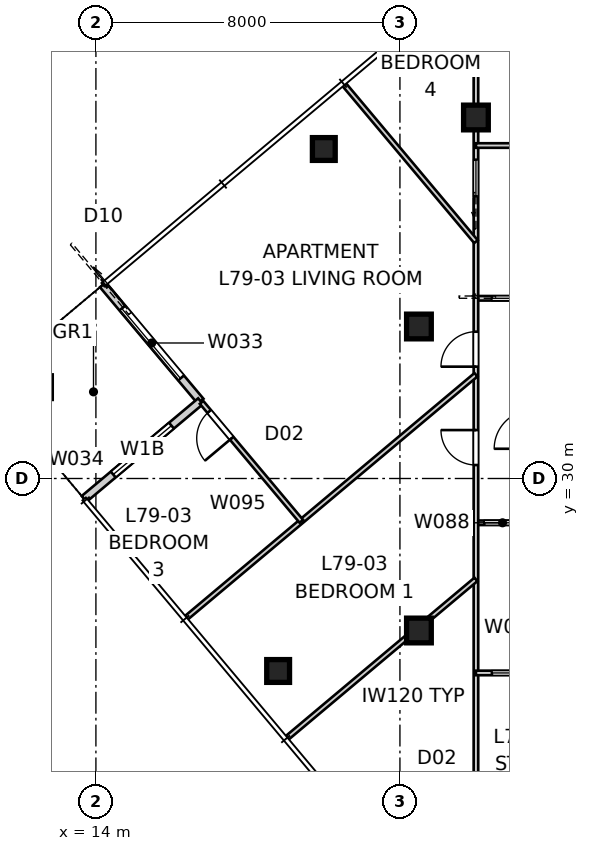
"""IFC4 building model, lengths in metres.
Left out: names, types, materials, properties, quantities, classifications, styles, units other than length and angle.
Written with IfcOpenShell. Run it as: python <this file> out.ifc"""

import sys

from ifc_helpers import new_model, si_unit, direction, frame, frame_2d, origin, origin_2d, place, context, subcontext, project, spatial, rectangle, extrude, element, fill, save


model = new_model("IFC4")
c1 = context("Model", 3, precision=1e-05, world=origin(), true_north=direction((0.0, 1.0)))
c2 = subcontext(c1, "Body", "Model", "MODEL_VIEW")
j1 = project(units=[si_unit("LENGTHUNIT", "METRE"), si_unit("PLANEANGLEUNIT", "RADIAN")], contexts=[c1])
p1 = place(None, origin())
s1 = spatial("IfcSite", under=j1, at=p1, CompositionType="ELEMENT")
p2 = place(p1, origin())
s2 = spatial("IfcBuilding", under=s1, at=p2, CompositionType="ELEMENT")
p3 = place(p2, frame((0.0, 0.0, 286.2)))
s3 = spatial("IfcBuildingStorey", under=s2, at=p3, CompositionType="ELEMENT", Elevation=286.2)
for number, where, z_axis, x_axis in (
    (1, (19.997, 38.671, 0.0), (0.0, 0.0, 1.0), (1.0, 0.0, 0.0)),
    (2, (18.795, 24.935, 0.0), (0.0, 0.0, 1.0), (1.0, 0.0, 0.0)),
):
    element("IfcColumn", number, at=place(p3, frame(where, z_axis=z_axis, x_axis=x_axis)), inside=s3, PredefinedType="COLUMN", context=c2, shape_type="SweptSolid", body=[
        extrude(rectangle(XDim=0.6, YDim=0.6, at=origin_2d()), origin(), (0.0, 0.0, 1.0), 3.4),
    ])
for number, where, z_axis, x_axis in (
    (3, (24.0, 39.5, 0.0), (0.0, 0.0, 1.0), (1.0, 0.0, 0.0)),
    (4, (22.5, 34.0, 0.0), (0.0, 0.0, 1.0), (1.0, 0.0, 0.0)),
    (5, (22.5, 26.0, 0.0), (0.0, 0.0, 1.0), (1.0, 0.0, 0.0)),
):
    element("IfcColumn", number, at=place(p3, frame(where, z_axis=z_axis, x_axis=x_axis)), inside=s3, PredefinedType="COLUMN", context=c2, shape_type="SweptSolid", body=[
        extrude(rectangle(XDim=0.65, YDim=0.65, at=origin_2d()), origin(), (0.0, 0.0, 1.0), 3.4),
    ])
p4 = place(p3, frame((14.183, 35.098, 0.0), z_axis=(0.0, 0.0, 1.0), x_axis=(0.642768287094, -0.766060656284, 0.0)))
e6 = element("IfcWall", 6, at=p4, inside=s3, PredefinedType="SOLIDWALL", context=c2, shape_type="SweptSolid", body=[
    extrude(rectangle(XDim=4.0, YDim=0.2, at=frame_2d((2.0, 0.0))), origin(), (0.0, 0.0, 1.0), 3.25),
])
p5 = place(p4, frame((0.8, 0.0, 0.0)))
e7 = element("IfcOpeningElement", 7, at=p5, cuts=e6, PredefinedType="OPENING", context=c2, shape_type="SweptSolid", body=[
    extrude(rectangle(XDim=2.4, YDim=2.4, at=frame_2d((1.2, 1.2))), frame((0.0, 0.11, 0.0), z_axis=(0.0, -1.0, 0.0), x_axis=(1.0, 0.0, 0.0)), (0.0, 0.0, 1.0), 0.22),
])
p6 = place(p3, frame((16.754, 32.034, 0.0), z_axis=(0.0, 0.0, 1.0), x_axis=(-0.766035437498, -0.642798342015, 0.0)))
e8 = element("IfcWall", 8, at=p6, inside=s3, PredefinedType="SOLIDWALL", context=c2, shape_type="SweptSolid", body=[
    extrude(rectangle(XDim=4.0, YDim=0.2, at=frame_2d((2.0, 0.0))), origin(), (0.0, 0.0, 1.0), 3.25),
])
p7 = place(p6, frame((1.0, 0.0, 0.45)))
e9 = element("IfcOpeningElement", 9, at=p7, cuts=e8, PredefinedType="OPENING", context=c2, shape_type="SweptSolid", body=[
    extrude(rectangle(XDim=2.0, YDim=1.8, at=frame_2d((1.0, 0.9))), frame((0.0, 0.11, 0.0), z_axis=(0.0, -1.0, 0.0), x_axis=(1.0, 0.0, 0.0)), (0.0, 0.0, 1.0), 0.22),
])
p8 = place(p3, frame((25.4, 28.834, 0.0), z_axis=(0.0, 0.0, 1.0), x_axis=(-1.0, 0.0, 0.0)))
e10 = element("IfcWall", 10, at=p8, inside=s3, PredefinedType="PARTITIONING", context=c2, shape_type="SweptSolid", body=[
    extrude(rectangle(XDim=1.4, YDim=0.12, at=frame_2d((0.7, 0.0))), origin(), (0.0, 0.0, 1.0), 3.25),
])
p9 = place(p8, frame((0.22, 0.0, 0.0)))
e11 = element("IfcOpeningElement", 11, at=p9, cuts=e10, PredefinedType="OPENING", context=c2, shape_type="SweptSolid", body=[
    extrude(rectangle(XDim=0.96, YDim=2.1, at=frame_2d((0.48, 1.05))), frame((0.0, 0.07, 0.0), z_axis=(0.0, -1.0, 0.0), x_axis=(1.0, 0.0, 0.0)), (0.0, 0.0, 1.0), 0.14),
])
p10 = place(p3, frame((24.0, 34.742, 0.0), z_axis=(0.0, 0.0, 1.0), x_axis=(1.0, 0.0, 0.0)))
e12 = element("IfcWall", 12, at=p10, inside=s3, PredefinedType="PARTITIONING", context=c2, shape_type="SweptSolid", body=[
    extrude(rectangle(XDim=3.9, YDim=0.12, at=frame_2d((1.95, 0.0))), origin(), (0.0, 0.0, 1.0), 3.25),
])
p11 = place(p10, frame((0.42, 0.0, 0.0)))
e13 = element("IfcOpeningElement", 13, at=p11, cuts=e12, PredefinedType="OPENING", context=c2, shape_type="SweptSolid", body=[
    extrude(rectangle(XDim=0.96, YDim=2.1, at=frame_2d((0.48, 1.05))), frame((0.0, 0.07, 0.0), z_axis=(0.0, -1.0, 0.0), x_axis=(1.0, 0.0, 0.0)), (0.0, 0.0, 1.0), 0.14),
])
p12 = place(p3, frame((24.0, 17.238, 0.0), z_axis=(0.0, 0.0, 1.0), x_axis=(0.0, 1.0, 0.0)))
e14 = element("IfcWall", 14, at=p12, inside=s3, PredefinedType="PARTITIONING", context=c2, shape_type="SweptSolid", body=[
    extrude(rectangle(XDim=26.045, YDim=0.12, at=frame_2d((13.022, 0.0))), origin(), (0.0, 0.0, 1.0), 2.55),
])
p13 = place(p12, frame((13.116, 0.0, 0.0)))
e15 = element("IfcOpeningElement", 15, at=p13, cuts=e14, PredefinedType="OPENING", context=c2, shape_type="SweptSolid", body=[
    extrude(rectangle(XDim=0.92, YDim=2.34, at=frame_2d((0.46, 1.17))), frame((0.0, 0.07, 0.0), z_axis=(0.0, -1.0, 0.0), x_axis=(1.0, 0.0, 0.0)), (0.0, 0.0, 1.0), 0.14),
])
p14 = place(p12, frame((15.705, 0.0, 0.0)))
e16 = element("IfcOpeningElement", 16, at=p14, cuts=e14, PredefinedType="OPENING", context=c2, shape_type="SweptSolid", body=[
    extrude(rectangle(XDim=0.92, YDim=2.34, at=frame_2d((0.46, 1.17))), frame((0.0, 0.07, 0.0), z_axis=(0.0, -1.0, 0.0), x_axis=(1.0, 0.0, 0.0)), (0.0, 0.0, 1.0), 0.14),
])
p15 = place(p12, frame((20.191, 0.0, 0.0)))
e17 = element("IfcOpeningElement", 17, at=p15, cuts=e14, PredefinedType="OPENING", context=c2, shape_type="SweptSolid", body=[
    extrude(rectangle(XDim=0.96, YDim=2.1, at=frame_2d((0.48, 1.05))), frame((0.0, 0.07, 0.0), z_axis=(0.0, -1.0, 0.0), x_axis=(1.0, 0.0, 0.0)), (0.0, 0.0, 1.0), 0.14),
])
p16 = place(p12, frame((3.631, 0.0, 0.0)))
e18 = element("IfcOpeningElement", 18, at=p16, cuts=e14, PredefinedType="OPENING", context=c2, shape_type="SweptSolid", body=[
    extrude(rectangle(XDim=0.92, YDim=2.34, at=frame_2d((0.46, 1.17))), frame((0.0, 0.07, 0.0), z_axis=(0.0, -1.0, 0.0), x_axis=(1.0, 0.0, 0.0)), (0.0, 0.0, 1.0), 0.14),
])
p17 = place(p3, frame((27.9, 24.883, 0.0), z_axis=(0.0, 0.0, 1.0), x_axis=(-1.0, 0.0, 0.0)))
e19 = element("IfcWall", 19, at=p17, inside=s3, PredefinedType="PARTITIONING", context=c2, shape_type="SweptSolid", body=[
    extrude(rectangle(XDim=3.9, YDim=0.12, at=frame_2d((1.95, 0.0))), origin(), (0.0, 0.0, 1.0), 3.25),
])
p18 = place(p17, frame((2.52, 0.0, 0.0)))
e20 = element("IfcOpeningElement", 20, at=p18, cuts=e19, PredefinedType="OPENING", context=c2, shape_type="SweptSolid", body=[
    extrude(rectangle(XDim=0.96, YDim=2.1, at=frame_2d((0.48, 1.05))), frame((0.0, 0.07, 0.0), z_axis=(0.0, -1.0, 0.0), x_axis=(1.0, 0.0, 0.0)), (0.0, 0.0, 1.0), 0.14),
])
p19 = place(p3, frame((27.9, 39.913, 0.0), z_axis=(0.0, 0.0, 1.0), x_axis=(-0.64279031777, 0.766042170759, 0.0)))
e21 = element("IfcWall", 21, at=p19, inside=s3, PredefinedType="PARTITIONING", context=c2, shape_type="SweptSolid", body=[
    extrude(rectangle(XDim=5.089, YDim=0.12, at=frame_2d((2.544, 0.0))), origin(), (0.0, 0.0, 1.0), 3.25),
])
p20 = place(p19, frame((2.084, 0.0, 0.0)))
e22 = element("IfcOpeningElement", 22, at=p20, cuts=e21, PredefinedType="OPENING", context=c2, shape_type="SweptSolid", body=[
    extrude(rectangle(XDim=0.96, YDim=2.1, at=frame_2d((0.48, 1.05))), frame((0.0, 0.07, 0.0), z_axis=(0.0, -1.0, 0.0), x_axis=(1.0, 0.0, 0.0)), (0.0, 0.0, 1.0), 0.14),
])
p21 = place(p3, frame((27.9, 38.762, 0.0), z_axis=(0.0, 0.0, 1.0), x_axis=(-1.0, 0.0, 0.0)))
e23 = element("IfcWall", 23, at=p21, inside=s3, PredefinedType="PARTITIONING", context=c2, shape_type="SweptSolid", body=[
    extrude(rectangle(XDim=3.9, YDim=0.12, at=frame_2d((1.95, 0.0))), origin(), (0.0, 0.0, 1.0), 2.796),
])
p22 = place(p21, frame((1.47, 0.0, 0.0)))
e24 = element("IfcOpeningElement", 24, at=p22, cuts=e23, PredefinedType="OPENING", context=c2, shape_type="SweptSolid", body=[
    extrude(rectangle(XDim=0.96, YDim=2.1, at=frame_2d((0.48, 1.05))), frame((0.0, 0.07, 0.0), z_axis=(0.0, -1.0, 0.0), x_axis=(1.0, 0.0, 0.0)), (0.0, 0.0, 1.0), 0.14),
])
p23 = place(p3, frame((24.0, 32.729, 0.0), z_axis=(0.0, 0.0, 1.0), x_axis=(-0.766044319693, -0.64278775678, 0.0)))
e25 = element("IfcWall", 25, at=p23, inside=s3, PredefinedType="PARTITIONING", context=c2, shape_type="SweptSolid", body=[
    extrude(rectangle(XDim=9.957, YDim=0.12, at=frame_2d((4.979, 0.0))), origin(), (0.0, 0.0, 1.0), 3.25),
])
p24 = place(p3, frame((19.406, 28.874, 0.0), z_axis=(0.0, 0.0, 1.0), x_axis=(-0.642767300664, 0.766061483953, 0.0)))
e26 = element("IfcWall", 26, at=p24, inside=s3, PredefinedType="PARTITIONING", context=c2, shape_type="SweptSolid", body=[
    extrude(rectangle(XDim=4.085, YDim=0.12, at=frame_2d((2.042, 0.0))), origin(), (0.0, 0.0, 1.0), 3.25),
])
p25 = place(p24, frame((2.853, 0.0, 0.0)))
e27 = element("IfcOpeningElement", 27, at=p25, cuts=e26, PredefinedType="OPENING", context=c2, shape_type="SweptSolid", body=[
    extrude(rectangle(XDim=0.92, YDim=2.34, at=frame_2d((0.46, 1.17))), frame((0.0, 0.07, 0.0), z_axis=(0.0, -1.0, 0.0), x_axis=(1.0, 0.0, 0.0)), (0.0, 0.0, 1.0), 0.14),
])
p26 = place(p3, frame((20.529, 40.37, 0.0), z_axis=(0.0, 0.0, 1.0), x_axis=(0.642799726543, -0.766034275706, 0.0)))
e28 = element("IfcWall", 28, at=p26, inside=s3, PredefinedType="PARTITIONING", context=c2, shape_type="SweptSolid", body=[
    extrude(rectangle(XDim=5.4, YDim=0.12, at=frame_2d((2.7, 0.0))), origin(), (0.0, 0.0, 1.0), 3.25),
])
p27 = place(p3, frame((24.0, 27.344, 0.0), z_axis=(0.0, 0.0, 1.0), x_axis=(-0.766051249233, -0.642779498388, 0.0)))
e29 = element("IfcWall", 29, at=p27, inside=s3, PredefinedType="PARTITIONING", context=c2, shape_type="SweptSolid", body=[
    extrude(rectangle(XDim=6.496, YDim=0.12, at=frame_2d((3.248, 0.0))), origin(), (0.0, 0.0, 1.0), 3.25),
])
p28 = place(p5, origin())
e30 = element("IfcDoor", 30, at=p28, inside=s3, OperationType="SLIDING_TO_LEFT", PredefinedType="DOOR", context=c2, shape_type="SweptSolid", body=[
    extrude(rectangle(XDim=2.4, YDim=2.4, at=frame_2d((1.2, 1.2))), frame((0.0, 0.025, 0.0), z_axis=(0.0, -1.0, 0.0), x_axis=(1.0, 0.0, 0.0)), (0.0, 0.0, 1.0), 0.05),
])
fill(e7, e30)
p29 = place(p7, origin())
e31 = element("IfcWindow", 31, at=p29, inside=s3, PartitioningType="SINGLE_PANEL", PredefinedType="WINDOW", context=c2, shape_type="SweptSolid", body=[
    extrude(rectangle(XDim=2.0, YDim=1.8, at=frame_2d((1.0, 0.9))), frame((0.0, 0.03, 0.0), z_axis=(0.0, -1.0, 0.0), x_axis=(1.0, 0.0, 0.0)), (0.0, 0.0, 1.0), 0.06),
])
fill(e9, e31)
p30 = place(p13, origin())
e32 = element("IfcDoor", 32, at=p30, inside=s3, OperationType="SINGLE_SWING_RIGHT", PredefinedType="DOOR", context=c2, shape_type="SweptSolid", body=[
    extrude(rectangle(XDim=0.92, YDim=2.34, at=frame_2d((0.46, 1.17))), frame((0.0, 0.025, 0.0), z_axis=(0.0, -1.0, 0.0), x_axis=(1.0, 0.0, 0.0)), (0.0, 0.0, 1.0), 0.05),
])
fill(e15, e32)
p31 = place(p11, origin())
e33 = element("IfcDoor", 33, at=p31, inside=s3, OperationType="SLIDING_TO_LEFT", PredefinedType="DOOR", context=c2, shape_type="SweptSolid", body=[
    extrude(rectangle(XDim=0.96, YDim=2.1, at=frame_2d((0.48, 1.05))), frame((0.0, 0.025, 0.0), z_axis=(0.0, -1.0, 0.0), x_axis=(1.0, 0.0, 0.0)), (0.0, 0.0, 1.0), 0.05),
])
fill(e13, e33)
p32 = place(p14, origin())
e34 = element("IfcDoor", 34, at=p32, inside=s3, OperationType="SINGLE_SWING_LEFT", PredefinedType="DOOR", context=c2, shape_type="SweptSolid", body=[
    extrude(rectangle(XDim=0.92, YDim=2.34, at=frame_2d((0.46, 1.17))), frame((0.0, 0.025, 0.0), z_axis=(0.0, -1.0, 0.0), x_axis=(1.0, 0.0, 0.0)), (0.0, 0.0, 1.0), 0.05),
])
fill(e16, e34)
p33 = place(p9, origin())
e35 = element("IfcDoor", 35, at=p33, inside=s3, OperationType="SLIDING_TO_LEFT", PredefinedType="DOOR", context=c2, shape_type="SweptSolid", body=[
    extrude(rectangle(XDim=0.96, YDim=2.1, at=frame_2d((0.48, 1.05))), frame((0.0, 0.025, 0.0), z_axis=(0.0, -1.0, 0.0), x_axis=(1.0, 0.0, 0.0)), (0.0, 0.0, 1.0), 0.05),
])
fill(e11, e35)
p34 = place(p15, origin())
e36 = element("IfcDoor", 36, at=p34, inside=s3, OperationType="SLIDING_TO_LEFT", PredefinedType="DOOR", context=c2, shape_type="SweptSolid", body=[
    extrude(rectangle(XDim=0.96, YDim=2.1, at=frame_2d((0.48, 1.05))), frame((0.0, 0.025, 0.0), z_axis=(0.0, -1.0, 0.0), x_axis=(1.0, 0.0, 0.0)), (0.0, 0.0, 1.0), 0.05),
])
fill(e17, e36)
p35 = place(p25, origin())
e37 = element("IfcDoor", 37, at=p35, inside=s3, OperationType="SINGLE_SWING_LEFT", PredefinedType="DOOR", context=c2, shape_type="SweptSolid", body=[
    extrude(rectangle(XDim=0.92, YDim=2.34, at=frame_2d((0.46, 1.17))), frame((0.0, 0.025, 0.0), z_axis=(0.0, -1.0, 0.0), x_axis=(1.0, 0.0, 0.0)), (0.0, 0.0, 1.0), 0.05),
])
fill(e27, e37)
p36 = place(p18, origin())
e38 = element("IfcDoor", 38, at=p36, inside=s3, OperationType="SLIDING_TO_LEFT", PredefinedType="DOOR", context=c2, shape_type="SweptSolid", body=[
    extrude(rectangle(XDim=0.96, YDim=2.1, at=frame_2d((0.48, 1.05))), frame((0.0, 0.025, 0.0), z_axis=(0.0, -1.0, 0.0), x_axis=(1.0, 0.0, 0.0)), (0.0, 0.0, 1.0), 0.05),
])
fill(e20, e38)
save(model, sys.argv[1])
